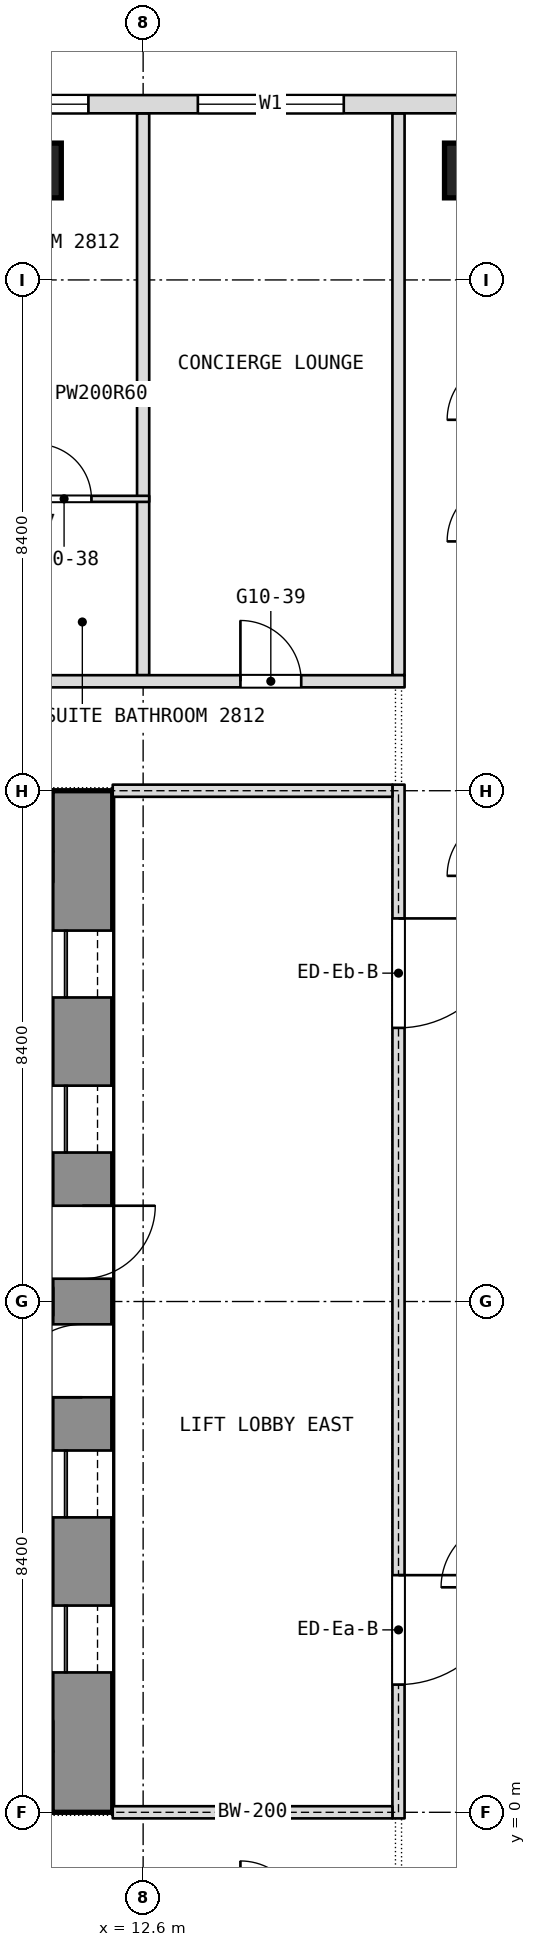
"""IFC4 building model, lengths in metres.
Left out: names, types, materials, properties, quantities, classifications, styles, units other than length and angle.
Written with IfcOpenShell. Run it as: python <this file> out.ifc"""

import sys

from ifc_helpers import new_model, si_unit, direction, frame, frame_2d, origin, origin_2d, place, context, subcontext, project, spatial, rectangle, extrude, element, fill, save


model = new_model("IFC4")
c1 = context("Model", 3, precision=1e-05, world=origin(), true_north=direction((0.0, 1.0)))
c2 = subcontext(c1, "Body", "Model", "MODEL_VIEW")
j1 = project(units=[si_unit("LENGTHUNIT", "METRE"), si_unit("PLANEANGLEUNIT", "RADIAN")], contexts=[c1])
p1 = place(None, origin())
s1 = spatial("IfcSite", under=j1, at=p1, CompositionType="ELEMENT")
p2 = place(p1, origin())
s2 = spatial("IfcBuilding", under=s1, at=p2, CompositionType="ELEMENT")
p3 = place(p2, frame((0.0, 0.0, 126.5)))
s3 = spatial("IfcBuildingStorey", under=s2, at=p3, CompositionType="ELEMENT", Elevation=126.5)
p4 = place(p3, frame((11.6, 0.0, 0.0), z_axis=(0.0, 0.0, 1.0), x_axis=(0.0, 1.0, 0.0)))
e1 = element("IfcWall", 1, at=p4, inside=s3, PredefinedType="SHEAR", context=c2, shape_type="SweptSolid", body=[
    extrude(rectangle(XDim=16.8, YDim=1.0, at=frame_2d((8.4, 0.0))), origin(), (0.0, 0.0, 1.0), 3.6),
])
p5 = place(p4, frame((2.3, 0.0, 0.0)))
e2 = element("IfcOpeningElement", 2, at=p5, cuts=e1, PredefinedType="OPENING", context=c2, shape_type="SweptSolid", body=[
    extrude(rectangle(XDim=1.1, YDim=2.1, at=frame_2d((0.55, 1.05))), frame((0.0, 0.5, 0.0), z_axis=(0.0, -1.0, 0.0), x_axis=(1.0, 0.0, 0.0)), (0.0, 0.0, 1.0), 1.0),
])
p6 = place(p4, frame((4.85, 0.0, 0.0)))
e3 = element("IfcOpeningElement", 3, at=p6, cuts=e1, PredefinedType="OPENING", context=c2, shape_type="SweptSolid", body=[
    extrude(rectangle(XDim=1.1, YDim=2.1, at=frame_2d((0.55, 1.05))), frame((0.0, 0.5, 0.0), z_axis=(0.0, -1.0, 0.0), x_axis=(1.0, 0.0, 0.0)), (0.0, 0.0, 1.0), 1.0),
])
p7 = place(p4, frame((6.825, 0.0, 0.0)))
e4 = element("IfcOpeningElement", 4, at=p7, cuts=e1, PredefinedType="OPENING", context=c2, shape_type="SweptSolid", body=[
    extrude(rectangle(XDim=1.2, YDim=2.1, at=frame_2d((0.6, 1.05))), frame((0.0, 0.5, 0.0), z_axis=(0.0, -1.0, 0.0), x_axis=(1.0, 0.0, 0.0)), (0.0, 0.0, 1.0), 1.0),
])
p8 = place(p4, frame((13.4, 0.0, 0.0)))
e5 = element("IfcOpeningElement", 5, at=p8, cuts=e1, PredefinedType="OPENING", context=c2, shape_type="SweptSolid", body=[
    extrude(rectangle(XDim=1.1, YDim=2.1, at=frame_2d((0.55, 1.05))), frame((0.0, 0.5, 0.0), z_axis=(0.0, -1.0, 0.0), x_axis=(1.0, 0.0, 0.0)), (0.0, 0.0, 1.0), 1.0),
])
p9 = place(p4, frame((10.85, 0.0, 0.0)))
e6 = element("IfcOpeningElement", 6, at=p9, cuts=e1, PredefinedType="OPENING", context=c2, shape_type="SweptSolid", body=[
    extrude(rectangle(XDim=1.1, YDim=2.1, at=frame_2d((0.55, 1.05))), frame((0.0, 0.5, 0.0), z_axis=(0.0, -1.0, 0.0), x_axis=(1.0, 0.0, 0.0)), (0.0, 0.0, 1.0), 1.0),
])
p10 = place(p4, frame((8.775, 0.0, 0.0)))
e7 = element("IfcOpeningElement", 7, at=p10, cuts=e1, PredefinedType="OPENING", context=c2, shape_type="SweptSolid", body=[
    extrude(rectangle(XDim=1.2, YDim=2.1, at=frame_2d((0.6, 1.05))), frame((0.0, 0.5, 0.0), z_axis=(0.0, -1.0, 0.0), x_axis=(1.0, 0.0, 0.0)), (0.0, 0.0, 1.0), 1.0),
])
for number, where, z_axis, x_axis in (
    (8, (10.804, 27.0, 0.0), (0.0, 0.0, 1.0), (1.0, 0.0, 0.0)),
    (9, (18.007, 27.0, 0.0), (0.0, 0.0, 1.0), (1.0, 0.0, 0.0)),
):
    element("IfcColumn", number, at=place(p3, frame(where, z_axis=z_axis, x_axis=x_axis)), inside=s3, PredefinedType="COLUMN", context=c2, shape_type="SweptSolid", body=[
        extrude(rectangle(XDim=0.9, YDim=0.9, at=origin_2d()), origin(), (0.0, 0.0, 1.0), 3.6),
    ])
for number, where, z_axis, x_axis in (
    (10, (16.8, 18.7, 0.0), (0.0, 0.0, 1.0), (0.0, 1.0, 0.0)),
    (11, (12.6, 18.7, 0.0), (0.0, 0.0, 1.0), (0.0, 1.0, 0.0)),
):
    element("IfcWall", number, at=place(p3, frame(where, z_axis=z_axis, x_axis=x_axis)), inside=s3, PredefinedType="PARTITIONING", context=c2, shape_type="SweptSolid", body=[
        extrude(rectangle(XDim=9.24, YDim=0.2, at=frame_2d((4.62, 0.0))), origin(), (0.0, 0.0, 1.0), 3.34),
    ])
p11 = place(p3, frame((10.7, 18.6, 0.0), z_axis=(0.0, 0.0, 1.0), x_axis=(1.0, 0.0, 0.0)))
e12 = element("IfcWall", 12, at=p11, inside=s3, PredefinedType="PARTITIONING", context=c2, shape_type="SweptSolid", body=[
    extrude(rectangle(XDim=6.2, YDim=0.2, at=frame_2d((3.1, 0.0))), origin(), (0.0, 0.0, 1.0), 3.34),
])
p12 = place(p11, frame((3.5, 0.0, 0.0)))
e13 = element("IfcOpeningElement", 13, at=p12, cuts=e12, PredefinedType="OPENING", context=c2, shape_type="SweptSolid", body=[
    extrude(rectangle(XDim=1.0, YDim=2.1, at=frame_2d((0.5, 1.05))), frame((0.0, 0.1, 0.0), z_axis=(0.0, -1.0, 0.0), x_axis=(1.0, 0.0, 0.0)), (0.0, 0.0, 1.0), 0.2),
])
p13 = place(p3, frame((10.7, 21.6, 0.0), z_axis=(0.0, 0.0, 1.0), x_axis=(1.0, 0.0, 0.0)))
e14 = element("IfcWall", 14, at=p13, inside=s3, PredefinedType="PARTITIONING", context=c2, shape_type="SweptSolid", body=[
    extrude(rectangle(XDim=2.0, YDim=0.1, at=frame_2d((1.0, 0.0))), origin(), (0.0, 0.0, 1.0), 3.34),
])
p14 = place(p13, frame((0.15, 0.0, 0.0)))
e15 = element("IfcOpeningElement", 15, at=p14, cuts=e14, PredefinedType="OPENING", context=c2, shape_type="SweptSolid", body=[
    extrude(rectangle(XDim=0.9, YDim=2.1, at=frame_2d((0.45, 1.05))), frame((0.0, 0.05, 0.0), z_axis=(0.0, -1.0, 0.0), x_axis=(1.0, 0.0, 0.0)), (0.0, 0.0, 1.0), 0.1),
])
p15 = place(p3, frame((21.306, 28.09, 0.0), z_axis=(0.0, 0.0, 1.0), x_axis=(-1.0, 0.0, 0.0)))
e16 = element("IfcWall", 16, at=p15, inside=s3, PredefinedType="NOTDEFINED", context=c2, shape_type="SweptSolid", body=[
    extrude(rectangle(XDim=42.612, YDim=0.3, at=frame_2d((21.306, 0.0))), origin(), (0.0, 0.0, 1.0), 3.6),
])
p16 = place(p15, frame((5.406, 0.0, 0.9)))
e17 = element("IfcOpeningElement", 17, at=p16, cuts=e16, PredefinedType="OPENING", context=c2, shape_type="SweptSolid", body=[
    extrude(rectangle(XDim=2.4, YDim=2.1, at=frame_2d((1.2, 1.05))), frame((0.0, 0.15, 0.0), z_axis=(0.0, -1.0, 0.0), x_axis=(1.0, 0.0, 0.0)), (0.0, 0.0, 1.0), 0.3),
])
p17 = place(p15, frame((9.606, 0.0, 0.9)))
e18 = element("IfcOpeningElement", 18, at=p17, cuts=e16, PredefinedType="OPENING", context=c2, shape_type="SweptSolid", body=[
    extrude(rectangle(XDim=2.4, YDim=2.1, at=frame_2d((1.2, 1.05))), frame((0.0, 0.15, 0.0), z_axis=(0.0, -1.0, 0.0), x_axis=(1.0, 0.0, 0.0)), (0.0, 0.0, 1.0), 0.3),
])
p18 = place(p15, frame((13.806, 0.0, 0.9)))
e19 = element("IfcOpeningElement", 19, at=p18, cuts=e16, PredefinedType="OPENING", context=c2, shape_type="SweptSolid", body=[
    extrude(rectangle(XDim=2.4, YDim=2.1, at=frame_2d((1.2, 1.05))), frame((0.0, 0.15, 0.0), z_axis=(0.0, -1.0, 0.0), x_axis=(1.0, 0.0, 0.0)), (0.0, 0.0, 1.0), 0.3),
])
p19 = place(p15, frame((18.006, 0.0, 0.9)))
e20 = element("IfcOpeningElement", 20, at=p19, cuts=e16, PredefinedType="OPENING", context=c2, shape_type="SweptSolid", body=[
    extrude(rectangle(XDim=2.4, YDim=2.1, at=frame_2d((1.2, 1.05))), frame((0.0, 0.15, 0.0), z_axis=(0.0, -1.0, 0.0), x_axis=(1.0, 0.0, 0.0)), (0.0, 0.0, 1.0), 0.3),
])
p20 = place(p15, frame((22.206, 0.0, 0.9)))
e21 = element("IfcOpeningElement", 21, at=p20, cuts=e16, PredefinedType="OPENING", context=c2, shape_type="SweptSolid", body=[
    extrude(rectangle(XDim=2.4, YDim=2.1, at=frame_2d((1.2, 1.05))), frame((0.0, 0.15, 0.0), z_axis=(0.0, -1.0, 0.0), x_axis=(1.0, 0.0, 0.0)), (0.0, 0.0, 1.0), 0.3),
])
p21 = place(p15, frame((26.406, 0.0, 0.9)))
e22 = element("IfcOpeningElement", 22, at=p21, cuts=e16, PredefinedType="OPENING", context=c2, shape_type="SweptSolid", body=[
    extrude(rectangle(XDim=2.4, YDim=2.1, at=frame_2d((1.2, 1.05))), frame((0.0, 0.15, 0.0), z_axis=(0.0, -1.0, 0.0), x_axis=(1.0, 0.0, 0.0)), (0.0, 0.0, 1.0), 0.3),
])
p22 = place(p15, frame((30.606, 0.0, 0.9)))
e23 = element("IfcOpeningElement", 23, at=p22, cuts=e16, PredefinedType="OPENING", context=c2, shape_type="SweptSolid", body=[
    extrude(rectangle(XDim=2.4, YDim=2.1, at=frame_2d((1.2, 1.05))), frame((0.0, 0.15, 0.0), z_axis=(0.0, -1.0, 0.0), x_axis=(1.0, 0.0, 0.0)), (0.0, 0.0, 1.0), 0.3),
])
p23 = place(p15, frame((34.806, 0.0, 0.9)))
e24 = element("IfcOpeningElement", 24, at=p23, cuts=e16, PredefinedType="OPENING", context=c2, shape_type="SweptSolid", body=[
    extrude(rectangle(XDim=2.4, YDim=2.1, at=frame_2d((1.2, 1.05))), frame((0.0, 0.15, 0.0), z_axis=(0.0, -1.0, 0.0), x_axis=(1.0, 0.0, 0.0)), (0.0, 0.0, 1.0), 0.3),
])
p24 = place(p3, frame((16.8, -0.1, 0.0), z_axis=(0.0, 0.0, 1.0), x_axis=(0.0, 1.0, 0.0)))
e25 = element("IfcWall", 25, at=p24, inside=s3, PredefinedType="PARTITIONING", context=c2, shape_type="SweptSolid", body=[
    extrude(rectangle(XDim=17.0, YDim=0.2, at=frame_2d((8.5, 0.0))), origin(), (0.0, 0.0, 1.0), 3.34),
])
p25 = place(p24, frame((2.2, 0.0, 0.0)))
e26 = element("IfcOpeningElement", 26, at=p25, cuts=e25, PredefinedType="OPENING", context=c2, shape_type="SweptSolid", body=[
    extrude(rectangle(XDim=1.8, YDim=2.1, at=frame_2d((0.9, 1.05))), frame((0.0, 0.1, 0.0), z_axis=(0.0, -1.0, 0.0), x_axis=(1.0, 0.0, 0.0)), (0.0, 0.0, 1.0), 0.2),
])
p26 = place(p24, frame((13.0, 0.0, 0.0)))
e27 = element("IfcOpeningElement", 27, at=p26, cuts=e25, PredefinedType="OPENING", context=c2, shape_type="SweptSolid", body=[
    extrude(rectangle(XDim=1.8, YDim=2.1, at=frame_2d((0.9, 1.05))), frame((0.0, 0.1, 0.0), z_axis=(0.0, -1.0, 0.0), x_axis=(1.0, 0.0, 0.0)), (0.0, 0.0, 1.0), 0.2),
])
for number, where, z_axis, x_axis in (
    (28, (12.1, 0.0, 0.0), (0.0, 0.0, 1.0), (1.0, 0.0, 0.0)),
    (29, (12.1, 16.8, 0.0), (0.0, 0.0, 1.0), (1.0, 0.0, 0.0)),
):
    element("IfcWall", number, at=place(p3, frame(where, z_axis=z_axis, x_axis=x_axis)), inside=s3, PredefinedType="PARTITIONING", context=c2, shape_type="SweptSolid", body=[
        extrude(rectangle(XDim=4.6, YDim=0.2, at=frame_2d((2.3, 0.0))), origin(), (0.0, 0.0, 1.0), 2.89),
    ])
p27 = place(p12, origin())
e30 = element("IfcDoor", 30, at=p27, inside=s3, OperationType="SINGLE_SWING_RIGHT", PredefinedType="DOOR", context=c2, shape_type="SweptSolid", body=[
    extrude(rectangle(XDim=1.0, YDim=2.1, at=frame_2d((0.5, 1.05))), frame((0.0, 0.025, 0.0), z_axis=(0.0, -1.0, 0.0), x_axis=(1.0, 0.0, 0.0)), (0.0, 0.0, 1.0), 0.05),
])
fill(e13, e30)
p28 = place(p14, origin())
e31 = element("IfcDoor", 31, at=p28, inside=s3, OperationType="SINGLE_SWING_RIGHT", PredefinedType="DOOR", context=c2, shape_type="SweptSolid", body=[
    extrude(rectangle(XDim=0.9, YDim=2.1, at=frame_2d((0.45, 1.05))), frame((0.0, 0.025, 0.0), z_axis=(0.0, -1.0, 0.0), x_axis=(1.0, 0.0, 0.0)), (0.0, 0.0, 1.0), 0.05),
])
fill(e15, e31)
p29 = place(p16, origin())
e32 = element("IfcWindow", 32, at=p29, inside=s3, PartitioningType="SINGLE_PANEL", PredefinedType="WINDOW", context=c2, shape_type="SweptSolid", body=[
    extrude(rectangle(XDim=2.4, YDim=2.1, at=frame_2d((1.2, 1.05))), frame((0.0, 0.03, 0.0), z_axis=(0.0, -1.0, 0.0), x_axis=(1.0, 0.0, 0.0)), (0.0, 0.0, 1.0), 0.06),
])
fill(e17, e32)
p30 = place(p17, origin())
e33 = element("IfcWindow", 33, at=p30, inside=s3, PartitioningType="SINGLE_PANEL", PredefinedType="WINDOW", context=c2, shape_type="SweptSolid", body=[
    extrude(rectangle(XDim=2.4, YDim=2.1, at=frame_2d((1.2, 1.05))), frame((0.0, 0.03, 0.0), z_axis=(0.0, -1.0, 0.0), x_axis=(1.0, 0.0, 0.0)), (0.0, 0.0, 1.0), 0.06),
])
fill(e18, e33)
p31 = place(p5, origin())
e34 = element("IfcDoor", 34, at=p31, inside=s3, OperationType="SLIDING_TO_LEFT", PredefinedType="DOOR", context=c2, shape_type="SweptSolid", body=[
    extrude(rectangle(XDim=1.1, YDim=2.1, at=frame_2d((0.55, 1.05))), frame((0.0, 0.025, 0.0), z_axis=(0.0, -1.0, 0.0), x_axis=(1.0, 0.0, 0.0)), (0.0, 0.0, 1.0), 0.05),
])
fill(e2, e34)
p32 = place(p6, origin())
e35 = element("IfcDoor", 35, at=p32, inside=s3, OperationType="SLIDING_TO_LEFT", PredefinedType="DOOR", context=c2, shape_type="SweptSolid", body=[
    extrude(rectangle(XDim=1.1, YDim=2.1, at=frame_2d((0.55, 1.05))), frame((0.0, 0.025, 0.0), z_axis=(0.0, -1.0, 0.0), x_axis=(1.0, 0.0, 0.0)), (0.0, 0.0, 1.0), 0.05),
])
fill(e3, e35)
p33 = place(p7, origin())
e36 = element("IfcDoor", 36, at=p33, inside=s3, OperationType="SINGLE_SWING_LEFT", PredefinedType="DOOR", context=c2, shape_type="SweptSolid", body=[
    extrude(rectangle(XDim=1.2, YDim=2.1, at=frame_2d((0.6, 1.05))), frame((0.0, 0.025, 0.0), z_axis=(0.0, -1.0, 0.0), x_axis=(1.0, 0.0, 0.0)), (0.0, 0.0, 1.0), 0.05),
])
fill(e4, e36)
p34 = place(p8, origin())
e37 = element("IfcDoor", 37, at=p34, inside=s3, OperationType="SLIDING_TO_LEFT", PredefinedType="DOOR", context=c2, shape_type="SweptSolid", body=[
    extrude(rectangle(XDim=1.1, YDim=2.1, at=frame_2d((0.55, 1.05))), frame((0.0, 0.025, 0.0), z_axis=(0.0, -1.0, 0.0), x_axis=(1.0, 0.0, 0.0)), (0.0, 0.0, 1.0), 0.05),
])
fill(e5, e37)
p35 = place(p9, origin())
e38 = element("IfcDoor", 38, at=p35, inside=s3, OperationType="SLIDING_TO_LEFT", PredefinedType="DOOR", context=c2, shape_type="SweptSolid", body=[
    extrude(rectangle(XDim=1.1, YDim=2.1, at=frame_2d((0.55, 1.05))), frame((0.0, 0.025, 0.0), z_axis=(0.0, -1.0, 0.0), x_axis=(1.0, 0.0, 0.0)), (0.0, 0.0, 1.0), 0.05),
])
fill(e6, e38)
p36 = place(p10, origin())
e39 = element("IfcDoor", 39, at=p36, inside=s3, OperationType="SINGLE_SWING_LEFT", PredefinedType="DOOR", context=c2, shape_type="SweptSolid", body=[
    extrude(rectangle(XDim=1.2, YDim=2.1, at=frame_2d((0.6, 1.05))), frame((0.0, 0.025, 0.0), z_axis=(0.0, -1.0, 0.0), x_axis=(1.0, 0.0, 0.0)), (0.0, 0.0, 1.0), 0.05),
])
fill(e7, e39)
p37 = place(p25, origin())
e40 = element("IfcDoor", 40, at=p37, inside=s3, OperationType="DOUBLE_DOOR_SINGLE_SWING", PredefinedType="DOOR", context=c2, shape_type="SweptSolid", body=[
    extrude(rectangle(XDim=1.8, YDim=2.1, at=frame_2d((0.9, 1.05))), frame((0.0, 0.025, 0.0), z_axis=(0.0, -1.0, 0.0), x_axis=(1.0, 0.0, 0.0)), (0.0, 0.0, 1.0), 0.05),
])
fill(e26, e40)
p38 = place(p26, origin())
e41 = element("IfcDoor", 41, at=p38, inside=s3, OperationType="DOUBLE_DOOR_SINGLE_SWING", PredefinedType="DOOR", context=c2, shape_type="SweptSolid", body=[
    extrude(rectangle(XDim=1.8, YDim=2.1, at=frame_2d((0.9, 1.05))), frame((0.0, 0.025, 0.0), z_axis=(0.0, -1.0, 0.0), x_axis=(1.0, 0.0, 0.0)), (0.0, 0.0, 1.0), 0.05),
])
fill(e27, e41)
save(model, sys.argv[1])
